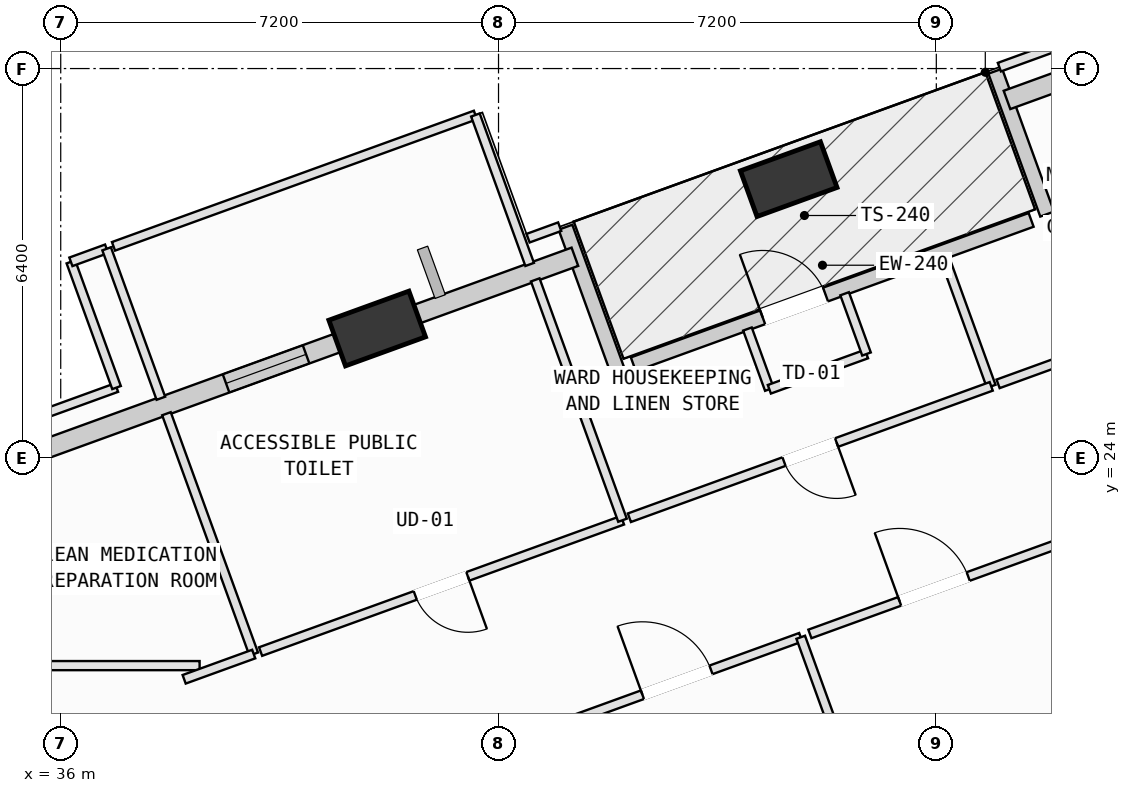
"""IFC4 building model, lengths in metres.
Left out: names, types, materials, properties, quantities, classifications, styles, units other than length and angle.
Written with IfcOpenShell. Run it as: python <this file> out.ifc"""

import sys

from ifc_helpers import new_model, si_unit, direction, frame, frame_2d, origin, origin_2d, place, context, subcontext, project, spatial, rectangle, extrude, element, fill, save


model = new_model("IFC4")
c1 = context("Model", 3, precision=1e-05, world=origin(), true_north=direction((0.0, 1.0)))
c2 = subcontext(c1, "Body", "Model", "MODEL_VIEW")
j1 = project(units=[si_unit("LENGTHUNIT", "METRE"), si_unit("PLANEANGLEUNIT", "RADIAN")], contexts=[c1])
p1 = place(None, origin())
s1 = spatial("IfcSite", under=j1, at=p1, CompositionType="ELEMENT")
p2 = place(p1, origin())
s2 = spatial("IfcBuilding", under=s1, at=p2, CompositionType="ELEMENT")
p3 = place(p2, frame((0.0, 0.0, 108.4)))
s3 = spatial("IfcBuildingStorey", under=s2, at=p3, CompositionType="ELEMENT", Elevation=108.4)
p4 = place(p3, frame((47.972, 28.581, 0.002), z_axis=(-0.016097543439, 0.059329203661, 0.998108668777), x_axis=(-0.818013974793, -0.574815784114, 0.020975017936)))
e1 = element("IfcColumn", 1, at=p4, inside=s3, PredefinedType="COLUMN", context=c2, shape_type="SweptSolid", body=[
    extrude(rectangle(XDim=1.4, YDim=0.8, at=origin_2d()), origin(), (0.0, 0.0, 1.0), 4.004),
])
p5 = place(p3, frame((41.205, 26.124, 0.002), z_axis=(-0.005739627582, 0.031445831967, 0.999488977592), x_axis=(-0.863479661457, -0.504265724422, 0.01090657706)))
e2 = element("IfcColumn", 2, at=p5, inside=s3, PredefinedType="COLUMN", context=c2, shape_type="SweptSolid", body=[
    extrude(rectangle(XDim=1.4, YDim=0.8, at=origin_2d()), origin(), (0.0, 0.0, 1.0), 3.998),
])
p6 = place(p3, frame((45.417, 25.536, 0.0), z_axis=(0.0, 0.0, 1.0), x_axis=(0.939988887758, 0.341205056955, 0.0)))
e3 = element("IfcWall", 3, at=p6, inside=s3, PredefinedType="SOLIDWALL", context=c2, shape_type="SweptSolid", body=[
    extrude(rectangle(XDim=6.96, YDim=0.24, at=frame_2d((3.48, 0.0))), origin(), (0.0, 0.0, 1.0), 2.945),
])
p7 = place(p6, frame((2.263, 0.0, 0.0)))
e4 = element("IfcOpeningElement", 4, at=p7, cuts=e3, PredefinedType="OPENING", context=c2, shape_type="SweptSolid", body=[
    extrude(rectangle(XDim=1.1, YDim=2.15, at=frame_2d((0.55, 1.075))), frame((0.0, 0.13, 0.0), z_axis=(0.0, -1.0, 0.0), x_axis=(1.0, 0.0, 0.0)), (0.0, 0.0, 1.0), 0.26),
])
p8 = place(p3, frame((44.301, 27.791, 0.0), z_axis=(0.0, 0.0, 1.0), x_axis=(0.341225482367, -0.939981473319, 0.0)))
e5 = element("IfcWall", 5, at=p8, inside=s3, PredefinedType="SOLIDWALL", context=c2, shape_type="SweptSolid", body=[
    extrude(rectangle(XDim=2.5, YDim=0.24, at=frame_2d((1.25, 0.0))), origin(), (0.0, 0.0, 1.0), 3.165),
])
p9 = place(p3, frame((52.222, 28.006, 0.0), z_axis=(0.0, 0.0, 1.0), x_axis=(-0.341194160902, 0.939992842827, 0.0)))
e6 = element("IfcWall", 6, at=p9, inside=s3, PredefinedType="SOLIDWALL", context=c2, shape_type="SweptSolid", body=[
    extrude(rectangle(XDim=2.5, YDim=0.24, at=frame_2d((1.25, 0.0))), origin(), (0.0, 0.0, 1.0), 3.165),
])
p10 = place(p3, frame((51.562, 29.884, 0.0), z_axis=(0.0, 0.0, 1.0), x_axis=(0.939992364917, 0.341195477547, 0.0)))
e7 = element("IfcWall", 7, at=p10, inside=s3, PredefinedType="SOLIDWALL", context=c2, shape_type="SweptSolid", body=[
    extrude(rectangle(XDim=2.076, YDim=0.32, at=frame_2d((1.038, 0.0))), origin(), (0.0, 0.0, 1.0), 2.945),
])
p11 = place(p3, frame((41.677, 26.296, 0.0), z_axis=(0.0, 0.0, 1.0), x_axis=(0.940003028964, 0.341166096701, 0.0)))
e8 = element("IfcWall", 8, at=p11, inside=s3, PredefinedType="SOLIDWALL", context=c2, shape_type="SweptSolid", body=[
    extrude(rectangle(XDim=2.956, YDim=0.32, at=frame_2d((1.478, 0.0))), origin(), (0.0, 0.0, 1.0), 3.145),
])
p12 = place(p3, frame((34.914, 23.841, 0.0), z_axis=(0.0, 0.0, 1.0), x_axis=(0.939995247313, 0.34118753645, 0.0)))
e9 = element("IfcWall", 9, at=p12, inside=s3, PredefinedType="SOLIDWALL", context=c2, shape_type="SweptSolid", body=[
    extrude(rectangle(XDim=6.211, YDim=0.32, at=frame_2d((3.105, 0.0))), origin(), (0.0, 0.0, 1.0), 3.165),
])
p13 = place(p12, frame((4.048, 0.0, 0.75)))
e10 = element("IfcOpeningElement", 10, at=p13, cuts=e9, PredefinedType="OPENING", context=c2, shape_type="SweptSolid", body=[
    extrude(rectangle(XDim=1.4, YDim=1.85, at=frame_2d((0.7, 0.925))), frame((0.0, 0.17, 0.0), z_axis=(0.0, -1.0, 0.0), x_axis=(1.0, 0.0, 0.0)), (0.0, 0.0, 1.0), 0.34),
])
p14 = place(p3, frame((44.091, 19.565, 0.0), z_axis=(0.0, 0.0, 1.0), x_axis=(0.939960863027, 0.341282252656, 0.0)))
e11 = element("IfcWall", 11, at=p14, inside=s3, PredefinedType="PARTITIONING", context=c2, shape_type="SweptSolid", body=[
    extrude(rectangle(XDim=4.339, YDim=0.15, at=frame_2d((2.17, 0.0))), origin(), (0.0, 0.0, 1.0), 3.78),
])
p15 = place(p14, frame((1.57, 0.0, 0.0)))
e12 = element("IfcOpeningElement", 12, at=p15, cuts=e11, PredefinedType="OPENING", context=c2, shape_type="SweptSolid", body=[
    extrude(rectangle(XDim=1.2, YDim=2.15, at=frame_2d((0.6, 1.075))), frame((0.0, 0.085, 0.0), z_axis=(0.0, -1.0, 0.0), x_axis=(1.0, 0.0, 0.0)), (0.0, 0.0, 1.0), 0.17),
])
p16 = place(p3, frame((48.17, 21.046, 0.0), z_axis=(0.0, 0.0, 1.0), x_axis=(0.341175718881, -0.93999953662, 0.0)))
e13 = element("IfcWall", 13, at=p16, inside=s3, PredefinedType="PARTITIONING", context=c2, shape_type="SweptSolid", body=[
    extrude(rectangle(XDim=13.615, YDim=0.15, at=frame_2d((6.807, 0.0))), origin(), (0.0, 0.0, 1.0), 3.78),
])
p17 = place(p3, frame((48.321, 21.101, 0.0), z_axis=(0.0, 0.0, 1.0), x_axis=(0.940033040483, 0.341083395667, 0.0)))
e14 = element("IfcWall", 14, at=p17, inside=s3, PredefinedType="PARTITIONING", context=c2, shape_type="SweptSolid", body=[
    extrude(rectangle(XDim=4.339, YDim=0.15, at=frame_2d((2.169, 0.0))), origin(), (0.0, 0.0, 1.0), 3.78),
])
p18 = place(p17, frame((1.57, 0.0, 0.0)))
e15 = element("IfcOpeningElement", 15, at=p18, cuts=e14, PredefinedType="OPENING", context=c2, shape_type="SweptSolid", body=[
    extrude(rectangle(XDim=1.2, YDim=2.15, at=frame_2d((0.6, 1.075))), frame((0.0, 0.085, 0.0), z_axis=(0.0, -1.0, 0.0), x_axis=(1.0, 0.0, 0.0)), (0.0, 0.0, 1.0), 0.17),
])
p19 = place(p3, frame((38.284, 20.58, 0.0), z_axis=(0.0, 0.0, 1.0), x_axis=(-1.0, 0.0, 0.0)))
e16 = element("IfcWall", 16, at=p19, inside=s3, PredefinedType="PARTITIONING", context=c2, shape_type="SweptSolid", body=[
    extrude(rectangle(XDim=5.776, YDim=0.15, at=frame_2d((2.888, 0.0))), origin(), (0.0, 0.0, 1.0), 3.365),
])
p20 = place(p19, frame((2.716, 0.0, 0.0)))
e17 = element("IfcOpeningElement", 17, at=p20, cuts=e16, PredefinedType="OPENING", context=c2, shape_type="SweptSolid", body=[
    extrude(rectangle(XDim=1.2, YDim=2.15, at=frame_2d((0.6, 1.075))), frame((0.0, 0.085, 0.0), z_axis=(0.0, -1.0, 0.0), x_axis=(1.0, 0.0, 0.0)), (0.0, 0.0, 1.0), 0.17),
])
p21 = place(p3, frame((31.554, 23.206, 0.0), z_axis=(0.0, 0.0, 1.0), x_axis=(0.939991879214, 0.341196815654, 0.0)))
e18 = element("IfcWall", 18, at=p21, inside=s3, PredefinedType="PARTITIONING", context=c2, shape_type="SweptSolid", body=[
    extrude(rectangle(XDim=5.707, YDim=0.15, at=frame_2d((2.853, 0.0))), origin(), (0.0, 0.0, 1.0), 3.78),
])
p22 = place(p3, frame((36.918, 25.153, 0.0), z_axis=(0.0, 0.0, 1.0), x_axis=(-0.341350985007, 0.939935904748, 0.0)))
e19 = element("IfcWall", 19, at=p22, inside=s3, PredefinedType="PARTITIONING", context=c2, shape_type="SweptSolid", body=[
    extrude(rectangle(XDim=2.2, YDim=0.15, at=frame_2d((1.1, 0.0))), origin(), (0.0, 0.0, 1.0), 3.78),
])
p23 = place(p3, frame((36.167, 27.221, 0.0), z_axis=(0.0, 0.0, 1.0), x_axis=(0.939622411687, 0.342212979672, 0.0)))
e20 = element("IfcWall", 20, at=p23, inside=s3, PredefinedType="PARTITIONING", context=c2, shape_type="SweptSolid", body=[
    extrude(rectangle(XDim=0.626, YDim=0.15, at=frame_2d((0.313, 0.0))), origin(), (0.0, 0.0, 1.0), 3.78),
])
p24 = place(p3, frame((36.755, 27.435, 0.0), z_axis=(0.0, 0.0, 1.0), x_axis=(0.341158268685, -0.940005870039, 0.0)))
e21 = element("IfcWall", 21, at=p24, inside=s3, PredefinedType="PARTITIONING", context=c2, shape_type="SweptSolid", body=[
    extrude(rectangle(XDim=2.615, YDim=0.15, at=frame_2d((1.308, 0.0))), origin(), (0.0, 0.0, 1.0), 3.78),
])
p25 = place(p3, frame((37.739, 24.723, 0.0), z_axis=(0.0, 0.0, 1.0), x_axis=(0.341248910369, -0.93997296832, 0.0)))
e22 = element("IfcWall", 22, at=p25, inside=s3, PredefinedType="PARTITIONING", context=c2, shape_type="SweptSolid", body=[
    extrude(rectangle(XDim=4.205, YDim=0.15, at=frame_2d((2.103, 0.0))), origin(), (0.0, 0.0, 1.0), 3.78),
])
p26 = place(p3, frame((39.174, 20.77, 0.0), z_axis=(0.0, 0.0, 1.0), x_axis=(-0.940050872134, -0.341034247253, 0.0)))
e23 = element("IfcWall", 23, at=p26, inside=s3, PredefinedType="PARTITIONING", context=c2, shape_type="SweptSolid", body=[
    extrude(rectangle(XDim=1.217, YDim=0.15, at=frame_2d((0.608, 0.0))), origin(), (0.0, 0.0, 1.0), 3.78),
])
p27 = place(p3, frame((45.239, 22.971, 0.0), z_axis=(0.0, 0.0, 1.0), x_axis=(-0.940017254775, -0.341126898273, 0.0)))
e24 = element("IfcWall", 24, at=p27, inside=s3, PredefinedType="PARTITIONING", context=c2, shape_type="SweptSolid", body=[
    extrude(rectangle(XDim=6.332, YDim=0.15, at=frame_2d((3.166, 0.0))), origin(), (0.0, 0.0, 1.0), 2.945),
])
p28 = place(p27, frame((2.706, 0.0, 0.0)))
e25 = element("IfcOpeningElement", 25, at=p28, cuts=e24, PredefinedType="OPENING", context=c2, shape_type="SweptSolid", body=[
    extrude(rectangle(XDim=0.92, YDim=2.1, at=frame_2d((0.46, 1.05))), frame((0.0, 0.085, 0.0), z_axis=(0.0, -1.0, 0.0), x_axis=(1.0, 0.0, 0.0)), (0.0, 0.0, 1.0), 0.17),
])
p29 = place(p3, frame((36.868, 27.476, 0.0), z_axis=(0.0, 0.0, 1.0), x_axis=(0.940021741488, 0.341114534329, 0.0)))
e26 = element("IfcWall", 26, at=p29, inside=s3, PredefinedType="PARTITIONING", context=c2, shape_type="SweptSolid", body=[
    extrude(rectangle(XDim=6.332, YDim=0.15, at=frame_2d((3.166, 0.0))), origin(), (0.0, 0.0, 1.0), 3.78),
])
p30 = place(p3, frame((42.82, 29.636, 0.0), z_axis=(0.0, 0.0, 1.0), x_axis=(0.341075765781, -0.940035808891, 0.0)))
e27 = element("IfcWall", 27, at=p30, inside=s3, PredefinedType="PARTITIONING", context=c2, shape_type="SweptSolid", body=[
    extrude(rectangle(XDim=2.615, YDim=0.15, at=frame_2d((1.307, 0.0))), origin(), (0.0, 0.0, 1.0), 3.78),
])
p31 = place(p3, frame((43.804, 26.924, 0.0), z_axis=(0.0, 0.0, 1.0), x_axis=(0.341230289232, -0.939979728351, 0.0)))
e28 = element("IfcWall", 28, at=p31, inside=s3, PredefinedType="PARTITIONING", context=c2, shape_type="SweptSolid", body=[
    extrude(rectangle(XDim=4.206, YDim=0.15, at=frame_2d((2.103, 0.0))), origin(), (0.0, 0.0, 1.0), 3.365),
])
p32 = place(p3, frame((47.294, 26.116, 0.0), z_axis=(0.0, 0.0, 1.0), x_axis=(0.341538545956, -0.93986776816, 0.0)))
e29 = element("IfcWall", 29, at=p32, inside=s3, PredefinedType="PARTITIONING", context=c2, shape_type="SweptSolid", body=[
    extrude(rectangle(XDim=1.054, YDim=0.15, at=frame_2d((0.527, 0.0))), origin(), (0.0, 0.0, 1.0), 3.78),
])
p33 = place(p3, frame((47.654, 25.125, 0.0), z_axis=(0.0, 0.0, 1.0), x_axis=(0.939977788085, 0.341235633994, 0.0)))
e30 = element("IfcWall", 30, at=p33, inside=s3, PredefinedType="PARTITIONING", context=c2, shape_type="SweptSolid", body=[
    extrude(rectangle(XDim=1.7, YDim=0.15, at=frame_2d((0.85, 0.0))), origin(), (0.0, 0.0, 1.0), 3.78),
])
p34 = place(p3, frame((49.252, 25.705, 0.0), z_axis=(0.0, 0.0, 1.0), x_axis=(-0.341333980298, 0.939942080074, 0.0)))
e31 = element("IfcWall", 31, at=p34, inside=s3, PredefinedType="PARTITIONING", context=c2, shape_type="SweptSolid", body=[
    extrude(rectangle(XDim=1.054, YDim=0.15, at=frame_2d((0.527, 0.0))), origin(), (0.0, 0.0, 1.0), 3.78),
])
p35 = place(p3, frame((50.534, 27.292, 0.0), z_axis=(0.0, 0.0, 1.0), x_axis=(0.34116904795, -0.940001957828, 0.0)))
e32 = element("IfcWall", 32, at=p35, inside=s3, PredefinedType="PARTITIONING", context=c2, shape_type="SweptSolid", body=[
    extrude(rectangle(XDim=2.254, YDim=0.15, at=frame_2d((1.127, 0.0))), origin(), (0.0, 0.0, 1.0), 3.78),
])
p36 = place(p3, frame((51.303, 25.173, 0.0), z_axis=(0.0, 0.0, 1.0), x_axis=(-0.939937453114, -0.341346721434, 0.0)))
e33 = element("IfcWall", 33, at=p36, inside=s3, PredefinedType="PARTITIONING", context=c2, shape_type="SweptSolid", body=[
    extrude(rectangle(XDim=6.331, YDim=0.15, at=frame_2d((3.166, 0.0))), origin(), (0.0, 0.0, 1.0), 3.78),
])
p37 = place(p36, frame((2.706, 0.0, 0.0)))
e34 = element("IfcOpeningElement", 34, at=p37, cuts=e33, PredefinedType="OPENING", context=c2, shape_type="SweptSolid", body=[
    extrude(rectangle(XDim=0.92, YDim=2.1, at=frame_2d((0.46, 1.05))), frame((0.0, 0.085, 0.0), z_axis=(0.0, -1.0, 0.0), x_axis=(1.0, 0.0, 0.0)), (0.0, 0.0, 1.0), 0.17),
])
p38 = place(p3, frame((43.686, 27.61, 0.0), z_axis=(0.0, 0.0, 1.0), x_axis=(0.939870699391, 0.341530479497, 0.0)))
e35 = element("IfcWall", 35, at=p38, inside=s3, PredefinedType="PARTITIONING", context=c2, shape_type="SweptSolid", body=[
    extrude(rectangle(XDim=0.553, YDim=0.15, at=frame_2d((0.277, 0.0))), origin(), (0.0, 0.0, 1.0), 3.145),
])
p39 = place(p3, frame((51.437, 30.423, 0.0), z_axis=(0.0, 0.0, 1.0), x_axis=(0.939977700779, 0.34123587449, 0.0)))
e36 = element("IfcWall", 36, at=p39, inside=s3, PredefinedType="PARTITIONING", context=c2, shape_type="SweptSolid", body=[
    extrude(rectangle(XDim=3.015, YDim=0.15, at=frame_2d((1.507, 0.0))), origin(), (0.0, 0.0, 1.0), 2.945),
])
p40 = place(p3, frame((55.925, 26.85, 0.0), z_axis=(0.0, 0.0, 1.0), x_axis=(-0.940038384463, -0.341068667187, 0.0)))
e37 = element("IfcWall", 37, at=p40, inside=s3, PredefinedType="PARTITIONING", context=c2, shape_type="SweptSolid", body=[
    extrude(rectangle(XDim=4.797, YDim=0.15, at=frame_2d((2.398, 0.0))), origin(), (0.0, 0.0, 1.0), 3.78),
])
p41 = place(p40, frame((1.798, 0.0, 0.0)))
e38 = element("IfcOpeningElement", 38, at=p41, cuts=e37, PredefinedType="OPENING", context=c2, shape_type="SweptSolid", body=[
    extrude(rectangle(XDim=1.2, YDim=2.15, at=frame_2d((0.6, 1.075))), frame((0.0, 0.085, 0.0), z_axis=(0.0, -1.0, 0.0), x_axis=(1.0, 0.0, 0.0)), (0.0, 0.0, 1.0), 0.17),
])
p42 = place(p7, origin())
e39 = element("IfcDoor", 39, at=p42, inside=s3, OperationType="SINGLE_SWING_LEFT", PredefinedType="DOOR", context=c2, shape_type="SweptSolid", body=[
    extrude(rectangle(XDim=1.1, YDim=2.15, at=frame_2d((0.55, 1.075))), frame((0.0, 0.025, 0.0), z_axis=(0.0, -1.0, 0.0), x_axis=(1.0, 0.0, 0.0)), (0.0, 0.0, 1.0), 0.05),
])
fill(e4, e39)
p43 = place(p13, origin())
e40 = element("IfcWindow", 40, at=p43, inside=s3, PartitioningType="SINGLE_PANEL", PredefinedType="WINDOW", context=c2, shape_type="SweptSolid", body=[
    extrude(rectangle(XDim=1.4, YDim=1.85, at=frame_2d((0.7, 0.925))), frame((0.0, 0.03, 0.0), z_axis=(0.0, -1.0, 0.0), x_axis=(1.0, 0.0, 0.0)), (0.0, 0.0, 1.0), 0.06),
])
fill(e10, e40)
p44 = place(p15, origin())
e41 = element("IfcDoor", 41, at=p44, inside=s3, OperationType="SINGLE_SWING_LEFT", PredefinedType="DOOR", context=c2, shape_type="SweptSolid", body=[
    extrude(rectangle(XDim=1.2, YDim=2.15, at=frame_2d((0.6, 1.075))), frame((0.0, 0.025, 0.0), z_axis=(0.0, -1.0, 0.0), x_axis=(1.0, 0.0, 0.0)), (0.0, 0.0, 1.0), 0.05),
])
fill(e12, e41)
p45 = place(p18, origin())
e42 = element("IfcDoor", 42, at=p45, inside=s3, OperationType="SINGLE_SWING_LEFT", PredefinedType="DOOR", context=c2, shape_type="SweptSolid", body=[
    extrude(rectangle(XDim=1.2, YDim=2.15, at=frame_2d((0.6, 1.075))), frame((0.0, 0.025, 0.0), z_axis=(0.0, -1.0, 0.0), x_axis=(1.0, 0.0, 0.0)), (0.0, 0.0, 1.0), 0.05),
])
fill(e15, e42)
p46 = place(p28, origin())
e43 = element("IfcDoor", 43, at=p46, inside=s3, OperationType="SINGLE_SWING_LEFT", PredefinedType="DOOR", context=c2, shape_type="SweptSolid", body=[
    extrude(rectangle(XDim=0.92, YDim=2.1, at=frame_2d((0.46, 1.05))), frame((0.0, 0.025, 0.0), z_axis=(0.0, -1.0, 0.0), x_axis=(1.0, 0.0, 0.0)), (0.0, 0.0, 1.0), 0.05),
])
fill(e25, e43)
p47 = place(p37, origin())
e44 = element("IfcDoor", 44, at=p47, inside=s3, OperationType="SINGLE_SWING_LEFT", PredefinedType="DOOR", context=c2, shape_type="SweptSolid", body=[
    extrude(rectangle(XDim=0.92, YDim=2.1, at=frame_2d((0.46, 1.05))), frame((0.0, 0.025, 0.0), z_axis=(0.0, -1.0, 0.0), x_axis=(1.0, 0.0, 0.0)), (0.0, 0.0, 1.0), 0.05),
])
fill(e34, e44)
save(model, sys.argv[1])
